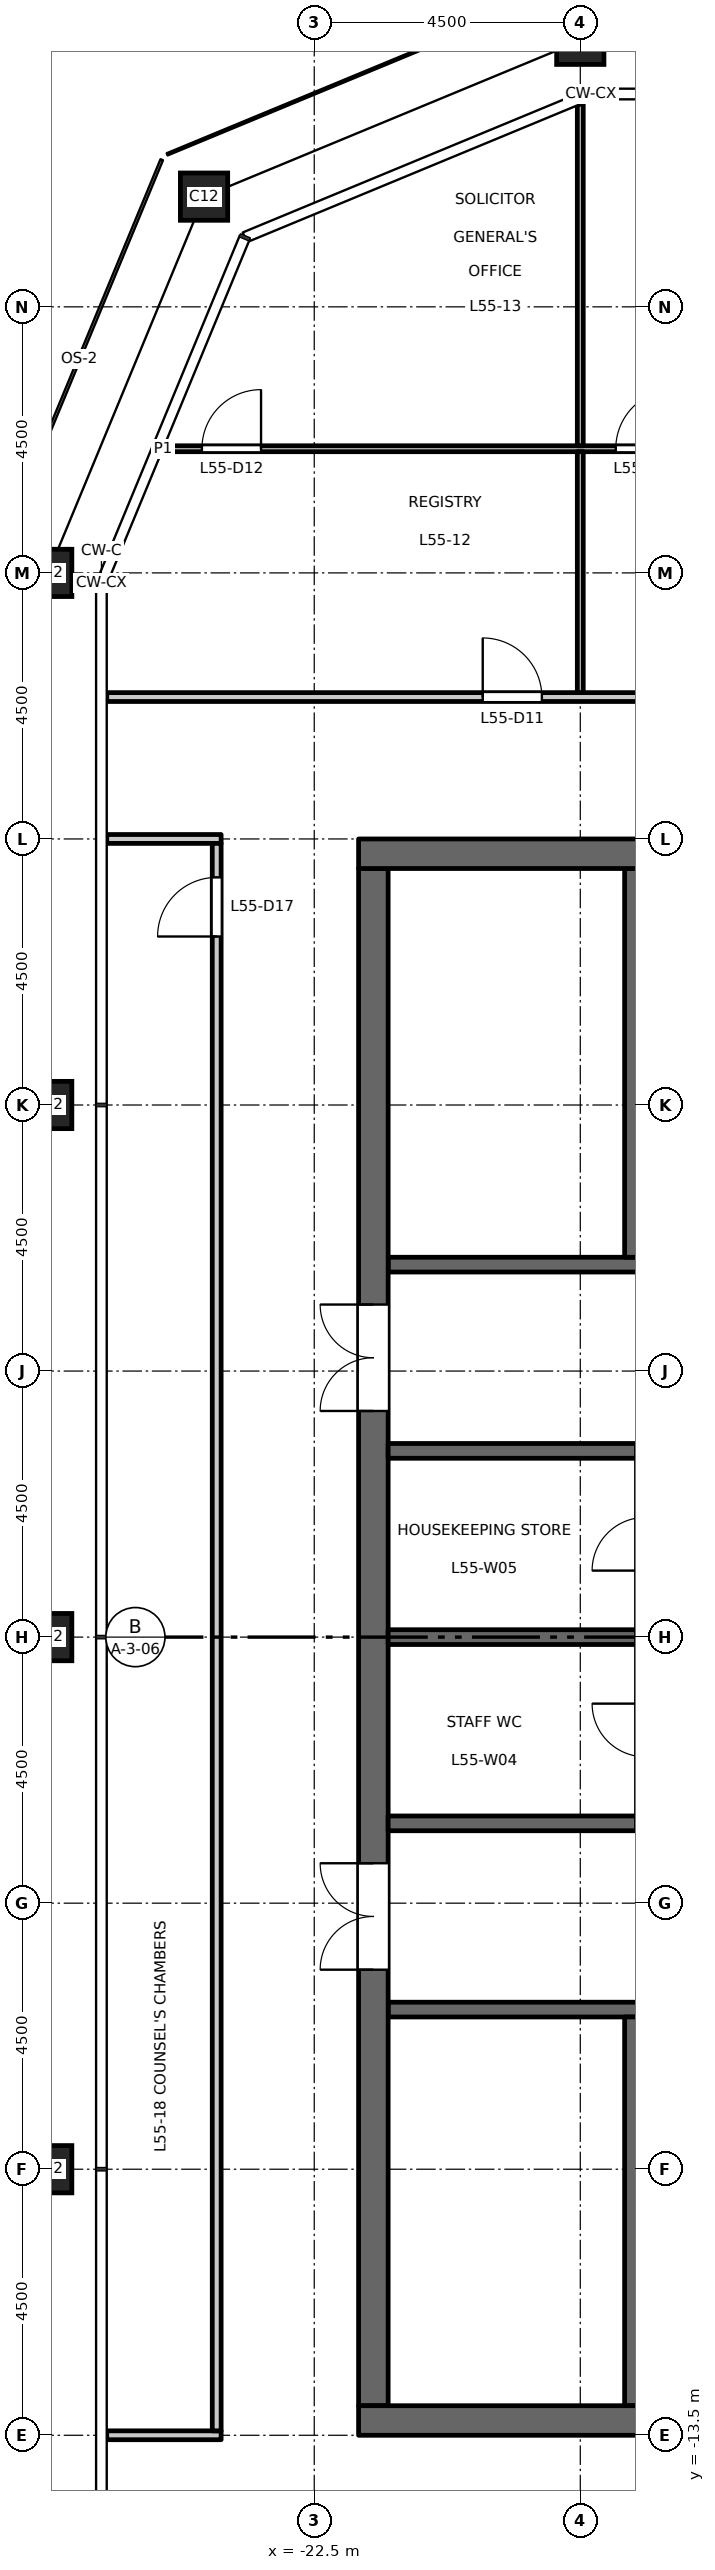
"""IFC4 building model, lengths in metres.
Left out: names, types, materials, properties, quantities, classifications, styles, units other than length and angle.
Written with IfcOpenShell. Run it as: python <this file> out.ifc"""

import sys

from ifc_helpers import new_model, si_unit, direction, frame, frame_2d, origin, origin_2d, place, context, subcontext, project, spatial, rectangle, hollow_rectangle, extrude, element, fill, save


model = new_model("IFC4")
c1 = context("Model", 3, precision=1e-05, world=origin(), true_north=direction((0.0, 1.0)))
c2 = subcontext(c1, "Body", "Model", "MODEL_VIEW")
j1 = project(units=[si_unit("LENGTHUNIT", "METRE"), si_unit("PLANEANGLEUNIT", "RADIAN")], contexts=[c1])
p1 = place(None, origin())
s1 = spatial("IfcSite", under=j1, at=p1, CompositionType="ELEMENT")
p2 = place(p1, origin())
s2 = spatial("IfcBuilding", under=s1, at=p2, CompositionType="ELEMENT")
p3 = place(p2, frame((0.0, 0.0, 255.7)))
s3 = spatial("IfcBuildingStorey", under=s2, at=p3, CompositionType="ELEMENT", Elevation=255.7)
for number, where, z_axis, x_axis in (
    (1, (-18.0, 27.0, 0.0), (0.0, 0.0, 1.0), (1.0, 0.0, 0.0)),
    (2, (-24.364, 24.364, 0.0), (0.0, 0.0, 1.0), (1.0, 0.0, 0.0)),
    (3, (-27.0, 18.0, 0.0), (0.0, 0.0, 1.0), (1.0, 0.0, 0.0)),
    (4, (-27.0, 9.0, 0.0), (0.0, 0.0, 1.0), (1.0, 0.0, 0.0)),
    (5, (-27.0, 0.0, 0.0), (0.0, 0.0, 1.0), (1.0, 0.0, 0.0)),
    (6, (-27.0, -9.0, 0.0), (0.0, 0.0, 1.0), (1.0, 0.0, 0.0)),
):
    element("IfcColumn", number, at=place(p3, frame(where, z_axis=z_axis, x_axis=x_axis)), inside=s3, PredefinedType="COLUMN", context=c2, shape_type="SweptSolid", body=[
        extrude(hollow_rectangle(XDim=0.8, YDim=0.8, WallThickness=0.045, at=origin_2d()), origin(), (0.0, 0.0, 1.0), 4.5),
    ])
p4 = place(p3, frame((-17.0, 6.3, 0.0), z_axis=(0.0, 0.0, 1.0), x_axis=(-1.0, 0.0, 0.0)))
e7 = element("IfcWall", 7, at=p4, inside=s3, PredefinedType="SHEAR", context=c2, shape_type="SweptSolid", body=[
    extrude(rectangle(XDim=4.25, YDim=0.25, at=frame_2d((2.125, 0.0))), origin(), (0.0, 0.0, 1.0), 4.35),
])
p5 = place(p3, frame((-12.15, -6.3, 0.0), z_axis=(0.0, 0.0, 1.0), x_axis=(-1.0, 0.0, 0.0)))
e8 = element("IfcWall", 8, at=p5, inside=s3, PredefinedType="SHEAR", context=c2, shape_type="SweptSolid", body=[
    extrude(rectangle(XDim=9.1, YDim=0.25, at=frame_2d((4.55, 0.0))), origin(), (0.0, 0.0, 1.0), 4.35),
])
p6 = place(p5, frame((1.8, 0.0, 0.0)))
e9 = element("IfcOpeningElement", 9, at=p6, cuts=e8, PredefinedType="OPENING", context=c2, shape_type="SweptSolid", body=[
    extrude(rectangle(XDim=1.0, YDim=2.1, at=frame_2d((0.5, 1.05))), frame((0.0, 0.135, 0.0), z_axis=(0.0, -1.0, 0.0), x_axis=(1.0, 0.0, 0.0)), (0.0, 0.0, 1.0), 0.27),
])
p7 = place(p3, frame((-21.5, -13.0, 0.0), z_axis=(0.0, 0.0, 1.0), x_axis=(0.0, 1.0, 0.0)))
e10 = element("IfcWall", 10, at=p7, inside=s3, PredefinedType="SHEAR", context=c2, shape_type="SweptSolid", body=[
    extrude(rectangle(XDim=26.0, YDim=0.5, at=frame_2d((13.0, 0.0))), origin(), (0.0, 0.0, 1.0), 4.35),
])
p8 = place(p7, frame((16.825, 0.0, 0.0)))
e11 = element("IfcOpeningElement", 11, at=p8, cuts=e10, PredefinedType="OPENING", context=c2, shape_type="SweptSolid", body=[
    extrude(rectangle(XDim=1.8, YDim=2.1, at=frame_2d((0.9, 1.05))), frame((0.0, 0.26, 0.0), z_axis=(0.0, -1.0, 0.0), x_axis=(1.0, 0.0, 0.0)), (0.0, 0.0, 1.0), 0.52),
])
p9 = place(p7, frame((7.375, 0.0, 0.0)))
e12 = element("IfcOpeningElement", 12, at=p9, cuts=e10, PredefinedType="OPENING", context=c2, shape_type="SweptSolid", body=[
    extrude(rectangle(XDim=1.8, YDim=2.1, at=frame_2d((0.9, 1.05))), frame((0.0, 0.26, 0.0), z_axis=(0.0, -1.0, 0.0), x_axis=(1.0, 0.0, 0.0)), (0.0, 0.0, 1.0), 0.52),
])
for number, where, z_axis, x_axis in (
    (13, (-17.05, 0.0, 0.0), (0.0, 0.0, 1.0), (-1.0, 0.0, 0.0)),
    (14, (-17.05, 3.15, 0.0), (0.0, 0.0, 1.0), (-1.0, 0.0, 0.0)),
    (15, (-17.05, -3.15, 0.0), (0.0, 0.0, 1.0), (-1.0, 0.0, 0.0)),
):
    element("IfcWall", number, at=place(p3, frame(where, z_axis=z_axis, x_axis=x_axis)), inside=s3, PredefinedType="SHEAR", context=c2, shape_type="SweptSolid", body=[
        extrude(rectangle(XDim=4.2, YDim=0.25, at=frame_2d((2.1, 0.0))), origin(), (0.0, 0.0, 1.0), 4.35),
    ])
for number, where, z_axis, x_axis in (
    (16, (-17.0, 6.425, 0.0), (0.0, 0.0, 1.0), (0.0, 1.0, 0.0)),
    (17, (-17.0, -13.0, 0.0), (0.0, 0.0, 1.0), (0.0, 1.0, 0.0)),
):
    element("IfcWall", number, at=place(p3, frame(where, z_axis=z_axis, x_axis=x_axis)), inside=s3, PredefinedType="SHEAR", context=c2, shape_type="SweptSolid", body=[
        extrude(rectangle(XDim=6.575, YDim=0.5, at=frame_2d((3.288, 0.0))), origin(), (0.0, 0.0, 1.0), 4.35),
    ])
for number, where, z_axis, x_axis in (
    (18, (-8.25, 13.25, 0.0), (0.0, 0.0, 1.0), (-1.0, 0.0, 0.0)),
    (19, (-8.25, -13.25, 0.0), (0.0, 0.0, 1.0), (-1.0, 0.0, 0.0)),
):
    element("IfcWall", number, at=place(p3, frame(where, z_axis=z_axis, x_axis=x_axis)), inside=s3, PredefinedType="SHEAR", context=c2, shape_type="SweptSolid", body=[
        extrude(rectangle(XDim=13.5, YDim=0.5, at=frame_2d((6.75, 0.0))), origin(), (0.0, 0.0, 1.0), 4.35),
    ])
p10 = place(p3, frame((-26.01, -13.5, 0.0), z_axis=(0.0, 0.0, 1.0), x_axis=(1.0, 0.0, 0.0)))
e20 = element("IfcWall", 20, at=p10, inside=s3, PredefinedType="PARTITIONING", context=c2, shape_type="SweptSolid", body=[
    extrude(rectangle(XDim=1.935, YDim=0.15, at=frame_2d((0.968, 0.0))), origin(), (0.0, 0.0, 1.0), 3.95),
])
p11 = place(p3, frame((-26.01, 13.5, 0.0), z_axis=(0.0, 0.0, 1.0), x_axis=(1.0, 0.0, 0.0)))
e21 = element("IfcWall", 21, at=p11, inside=s3, PredefinedType="PARTITIONING", context=c2, shape_type="SweptSolid", body=[
    extrude(rectangle(XDim=1.935, YDim=0.15, at=frame_2d((0.968, 0.0))), origin(), (0.0, 0.0, 1.0), 4.35),
])
p12 = place(p3, frame((-26.01, 15.9, 0.0), z_axis=(0.0, 0.0, 1.0), x_axis=(1.0, 0.0, 0.0)))
e22 = element("IfcWall", 22, at=p12, inside=s3, PredefinedType="PARTITIONING", context=c2, shape_type="SweptSolid", body=[
    extrude(rectangle(XDim=52.02, YDim=0.15, at=frame_2d((26.01, 0.0))), origin(), (0.0, 0.0, 1.0), 4.35),
])
p13 = place(p12, frame((15.36, 0.0, 0.0)))
e23 = element("IfcOpeningElement", 23, at=p13, cuts=e22, PredefinedType="OPENING", context=c2, shape_type="SweptSolid", body=[
    extrude(rectangle(XDim=1.0, YDim=2.1, at=frame_2d((0.5, 1.05))), frame((0.0, 0.085, 0.0), z_axis=(0.0, -1.0, 0.0), x_axis=(1.0, 0.0, 0.0)), (0.0, 0.0, 1.0), 0.17),
])
p14 = place(p12, frame((24.36, 0.0, 0.0)))
e24 = element("IfcOpeningElement", 24, at=p14, cuts=e22, PredefinedType="OPENING", context=c2, shape_type="SweptSolid", body=[
    extrude(rectangle(XDim=1.0, YDim=2.1, at=frame_2d((0.5, 1.05))), frame((0.0, 0.085, 0.0), z_axis=(0.0, -1.0, 0.0), x_axis=(1.0, 0.0, 0.0)), (0.0, 0.0, 1.0), 0.17),
])
p15 = place(p12, frame((26.61, 0.0, 0.0)))
e25 = element("IfcOpeningElement", 25, at=p15, cuts=e22, PredefinedType="OPENING", context=c2, shape_type="SweptSolid", body=[
    extrude(rectangle(XDim=1.0, YDim=2.1, at=frame_2d((0.5, 1.05))), frame((0.0, 0.085, 0.0), z_axis=(0.0, -1.0, 0.0), x_axis=(1.0, 0.0, 0.0)), (0.0, 0.0, 1.0), 0.17),
])
p16 = place(p12, frame((42.36, 0.0, 0.0)))
e26 = element("IfcOpeningElement", 26, at=p16, cuts=e22, PredefinedType="OPENING", context=c2, shape_type="SweptSolid", body=[
    extrude(rectangle(XDim=1.0, YDim=2.1, at=frame_2d((0.5, 1.05))), frame((0.0, 0.085, 0.0), z_axis=(0.0, -1.0, 0.0), x_axis=(1.0, 0.0, 0.0)), (0.0, 0.0, 1.0), 0.17),
])
p17 = place(p12, frame((6.36, 0.0, 0.0)))
e27 = element("IfcOpeningElement", 27, at=p17, cuts=e22, PredefinedType="OPENING", context=c2, shape_type="SweptSolid", body=[
    extrude(rectangle(XDim=1.0, YDim=2.1, at=frame_2d((0.5, 1.05))), frame((0.0, 0.085, 0.0), z_axis=(0.0, -1.0, 0.0), x_axis=(1.0, 0.0, 0.0)), (0.0, 0.0, 1.0), 0.17),
])
p18 = place(p12, frame((50.37, 0.0, 0.0)))
e28 = element("IfcOpeningElement", 28, at=p18, cuts=e22, PredefinedType="OPENING", context=c2, shape_type="SweptSolid", body=[
    extrude(rectangle(XDim=1.0, YDim=2.1, at=frame_2d((0.5, 1.05))), frame((0.0, 0.085, 0.0), z_axis=(0.0, -1.0, 0.0), x_axis=(1.0, 0.0, 0.0)), (0.0, 0.0, 1.0), 0.17),
])
p19 = place(p3, frame((-25.058, 20.1, 0.0), z_axis=(0.0, 0.0, 1.0), x_axis=(1.0, 0.0, 0.0)))
e29 = element("IfcWall", 29, at=p19, inside=s3, PredefinedType="PARTITIONING", context=c2, shape_type="SweptSolid", body=[
    extrude(rectangle(XDim=16.008, YDim=0.1, at=frame_2d((8.004, 0.0))), origin(), (0.0, 0.0, 1.0), 4.35),
])
p20 = place(p19, frame((7.658, 0.0, 0.0)))
e30 = element("IfcOpeningElement", 30, at=p20, cuts=e29, PredefinedType="OPENING", context=c2, shape_type="SweptSolid", body=[
    extrude(rectangle(XDim=1.0, YDim=2.1, at=frame_2d((0.5, 1.05))), frame((0.0, 0.06, 0.0), z_axis=(0.0, -1.0, 0.0), x_axis=(1.0, 0.0, 0.0)), (0.0, 0.0, 1.0), 0.12),
])
p21 = place(p19, frame((0.658, 0.0, 0.0)))
e31 = element("IfcOpeningElement", 31, at=p21, cuts=e29, PredefinedType="OPENING", context=c2, shape_type="SweptSolid", body=[
    extrude(rectangle(XDim=1.0, YDim=2.1, at=frame_2d((0.5, 1.05))), frame((0.0, 0.06, 0.0), z_axis=(0.0, -1.0, 0.0), x_axis=(1.0, 0.0, 0.0)), (0.0, 0.0, 1.0), 0.12),
])
p22 = place(p3, frame((-24.15, -13.425, 0.0), z_axis=(0.0, 0.0, 1.0), x_axis=(0.0, 1.0, 0.0)))
e32 = element("IfcWall", 32, at=p22, inside=s3, PredefinedType="PARTITIONING", context=c2, shape_type="SweptSolid", body=[
    extrude(rectangle(XDim=26.85, YDim=0.15, at=frame_2d((13.425, 0.0))), origin(), (0.0, 0.0, 1.0), 4.35),
])
p23 = place(p22, frame((25.275, 0.0, 0.0)))
e33 = element("IfcOpeningElement", 33, at=p23, cuts=e32, PredefinedType="OPENING", context=c2, shape_type="SweptSolid", body=[
    extrude(rectangle(XDim=1.0, YDim=2.1, at=frame_2d((0.5, 1.05))), frame((0.0, 0.085, 0.0), z_axis=(0.0, -1.0, 0.0), x_axis=(1.0, 0.0, 0.0)), (0.0, 0.0, 1.0), 0.17),
])
p24 = place(p3, frame((-18.0, 15.975, 0.0), z_axis=(0.0, 0.0, 1.0), x_axis=(0.0, 1.0, 0.0)))
e34 = element("IfcWall", 34, at=p24, inside=s3, PredefinedType="PARTITIONING", context=c2, shape_type="SweptSolid", body=[
    extrude(rectangle(XDim=4.075, YDim=0.1, at=frame_2d((2.038, 0.0))), origin(), (0.0, 0.0, 1.0), 3.65),
])
p25 = place(p3, frame((-18.0, 20.15, 0.0), z_axis=(0.0, 0.0, 1.0), x_axis=(0.0, 1.0, 0.0)))
e35 = element("IfcWall", 35, at=p25, inside=s3, PredefinedType="PARTITIONING", context=c2, shape_type="SweptSolid", body=[
    extrude(rectangle(XDim=5.778, YDim=0.1, at=frame_2d((2.889, 0.0))), origin(), (0.0, 0.0, 1.0), 3.65),
])
p26 = place(p8, origin())
e36 = element("IfcDoor", 36, at=p26, inside=s3, OperationType="DOUBLE_DOOR_DOUBLE_SWING", PredefinedType="DOOR", context=c2, shape_type="SweptSolid", body=[
    extrude(rectangle(XDim=1.8, YDim=2.1, at=frame_2d((0.9, 1.05))), frame((0.0, 0.025, 0.0), z_axis=(0.0, -1.0, 0.0), x_axis=(1.0, 0.0, 0.0)), (0.0, 0.0, 1.0), 0.05),
])
fill(e11, e36)
p27 = place(p9, origin())
e37 = element("IfcDoor", 37, at=p27, inside=s3, OperationType="DOUBLE_DOOR_DOUBLE_SWING", PredefinedType="DOOR", context=c2, shape_type="SweptSolid", body=[
    extrude(rectangle(XDim=1.8, YDim=2.1, at=frame_2d((0.9, 1.05))), frame((0.0, 0.025, 0.0), z_axis=(0.0, -1.0, 0.0), x_axis=(1.0, 0.0, 0.0)), (0.0, 0.0, 1.0), 0.05),
])
fill(e12, e37)
p28 = place(p20, origin())
e38 = element("IfcDoor", 38, at=p28, inside=s3, OperationType="SINGLE_SWING_RIGHT", PredefinedType="DOOR", context=c2, shape_type="SweptSolid", body=[
    extrude(rectangle(XDim=1.0, YDim=2.1, at=frame_2d((0.5, 1.05))), frame((0.0, 0.025, 0.0), z_axis=(0.0, -1.0, 0.0), x_axis=(1.0, 0.0, 0.0)), (0.0, 0.0, 1.0), 0.05),
])
fill(e30, e38)
p29 = place(p17, origin())
e39 = element("IfcDoor", 39, at=p29, inside=s3, OperationType="SINGLE_SWING_LEFT", PredefinedType="DOOR", context=c2, shape_type="SweptSolid", body=[
    extrude(rectangle(XDim=1.0, YDim=2.1, at=frame_2d((0.5, 1.05))), frame((0.0, 0.025, 0.0), z_axis=(0.0, -1.0, 0.0), x_axis=(1.0, 0.0, 0.0)), (0.0, 0.0, 1.0), 0.05),
])
fill(e27, e39)
p30 = place(p21, origin())
e40 = element("IfcDoor", 40, at=p30, inside=s3, OperationType="SINGLE_SWING_RIGHT", PredefinedType="DOOR", context=c2, shape_type="SweptSolid", body=[
    extrude(rectangle(XDim=1.0, YDim=2.1, at=frame_2d((0.5, 1.05))), frame((0.0, 0.025, 0.0), z_axis=(0.0, -1.0, 0.0), x_axis=(1.0, 0.0, 0.0)), (0.0, 0.0, 1.0), 0.05),
])
fill(e31, e40)
p31 = place(p23, origin())
e41 = element("IfcDoor", 41, at=p31, inside=s3, OperationType="SINGLE_SWING_LEFT", PredefinedType="DOOR", context=c2, shape_type="SweptSolid", body=[
    extrude(rectangle(XDim=1.0, YDim=2.1, at=frame_2d((0.5, 1.05))), frame((0.0, 0.025, 0.0), z_axis=(0.0, -1.0, 0.0), x_axis=(1.0, 0.0, 0.0)), (0.0, 0.0, 1.0), 0.05),
])
fill(e33, e41)
save(model, sys.argv[1])
